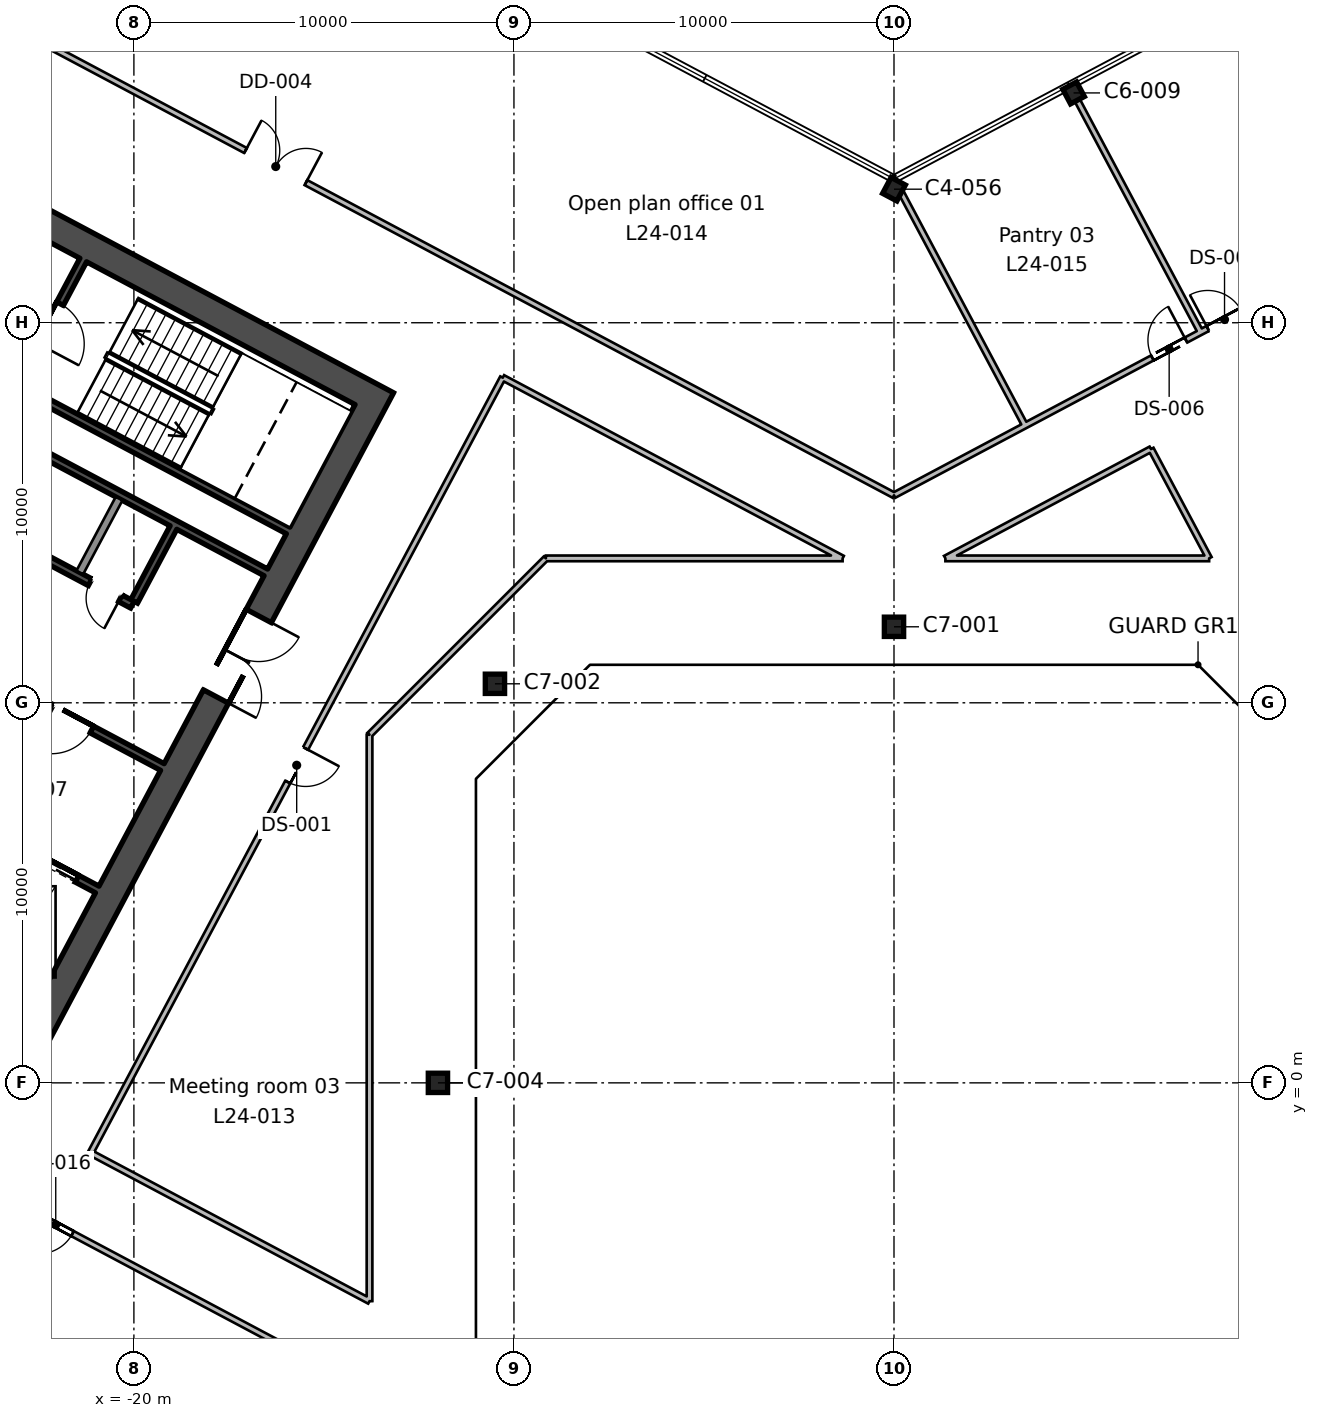
"""IFC4 building model, lengths in metres.
Left out: names, types, materials, properties, quantities, classifications, styles, units other than length and angle.
Written with IfcOpenShell. Run it as: python <this file> out.ifc"""

import sys

from ifc_helpers import new_model, si_unit, direction, frame, frame_2d, origin, origin_2d, place, context, subcontext, project, spatial, rectangle, hollow_rectangle, i_section, extrude, element, fill, save


model = new_model("IFC4")
c1 = context("Model", 3, precision=1e-05, world=origin(), true_north=direction((0.0, 1.0)))
c2 = subcontext(c1, "Body", "Model", "MODEL_VIEW")
j1 = project(units=[si_unit("LENGTHUNIT", "METRE"), si_unit("PLANEANGLEUNIT", "RADIAN")], contexts=[c1])
p1 = place(None, origin())
s1 = spatial("IfcSite", under=j1, at=p1, CompositionType="ELEMENT")
p2 = place(p1, origin())
s2 = spatial("IfcBuilding", under=s1, at=p2, CompositionType="ELEMENT")
p3 = place(p2, frame((0.0, 0.0, 122.2)))
s3 = spatial("IfcBuildingStorey", under=s2, at=p3, CompositionType="ELEMENT", Elevation=122.2)
for number, where, z_axis, x_axis in (
    (1, (-12.0, 0.0, 0.0), (0.0, 0.0, 1.0), (1.0, 0.0, 0.0)),
    (2, (-10.5, 10.5, 0.0), (0.0, 0.0, 1.0), (1.0, 0.0, 0.0)),
    (3, (0.0, 12.0, 0.0), (0.0, 0.0, 1.0), (1.0, 0.0, 0.0)),
):
    element("IfcColumn", number, at=place(p3, frame(where, z_axis=z_axis, x_axis=x_axis)), inside=s3, PredefinedType="COLUMN", context=c2, shape_type="SweptSolid", body=[
        extrude(hollow_rectangle(XDim=0.508, YDim=0.508, WallThickness=0.012, InnerFilletRadius=0.006, OuterFilletRadius=0.018, at=origin_2d()), origin(), (0.0, 0.0, 1.0), 4.0),
    ])
p4 = place(p3, frame((0.0, 23.514, 0.0), z_axis=(0.0, 0.0, 1.0), x_axis=(-0.882947592859, 0.469471562786, 0.0)))
e4 = element("IfcColumn", 4, at=p4, inside=s3, PredefinedType="COLUMN", context=c2, shape_type="SweptSolid", body=[
    extrude(i_section(OverallWidth=0.424, OverallDepth=0.475, WebThickness=0.048, FlangeThickness=0.077, FilletRadius=0.015, at=origin_2d()), origin(), (0.0, 0.0, 1.0), 4.0),
])
p5 = place(p3, frame((4.725, 26.047, 0.0), z_axis=(0.0, 0.0, 1.0), x_axis=(-0.882947592859, -0.469471562786, 0.0)))
e5 = element("IfcColumn", 5, at=p5, inside=s3, PredefinedType="COLUMN", context=c2, shape_type="SweptSolid", body=[
    extrude(i_section(OverallWidth=0.412, OverallDepth=0.434, WebThickness=0.036, FlangeThickness=0.057, FilletRadius=0.015, at=origin_2d()), origin(), (0.0, 0.0, 1.0), 4.0),
])
p6 = place(p3, frame((-13.498, 18.333, 0.0), z_axis=(0.0, 0.0, 1.0), x_axis=(-0.469469918705, -0.88294846703, 0.0)))
e6 = element("IfcWall", 6, at=p6, inside=s3, PredefinedType="SHEAR", context=c2, shape_type="SweptSolid", body=[
    extrude(rectangle(XDim=19.7, YDim=0.75, at=frame_2d((9.85, 0.0))), origin(), (0.0, 0.0, 1.0), 4.0),
])
p7 = place(p6, frame((6.85, 0.0, 0.0)))
e7 = element("IfcOpeningElement", 7, at=p7, cuts=e6, PredefinedType="OPENING", context=c2, shape_type="SweptSolid", body=[
    extrude(rectangle(XDim=2.4, YDim=2.4, at=frame_2d((1.2, 1.2))), frame((0.0, 0.385, 0.0), z_axis=(0.0, -1.0, 0.0), x_axis=(1.0, 0.0, 0.0)), (0.0, 0.0, 1.0), 0.77),
])
p8 = place(p3, frame((-14.005, 18.178, 0.0), z_axis=(0.0, 0.0, 1.0), x_axis=(-0.88295010195, 0.469466843842, 0.0)))
e8 = element("IfcWall", 8, at=p8, inside=s3, PredefinedType="SHEAR", context=c2, shape_type="SweptSolid", body=[
    extrude(rectangle(XDim=20.2, YDim=0.75, at=frame_2d((10.1, 0.0))), origin(), (0.0, 0.0, 1.0), 4.0),
])
p9 = place(p3, frame((-18.96, 14.611, 0.0), z_axis=(0.0, 0.0, 1.0), x_axis=(-0.4694473164, -0.882960484464, 0.0)))
e9 = element("IfcWall", 9, at=p9, inside=s3, PredefinedType="SHEAR", context=c2, shape_type="SweptSolid", body=[
    extrude(rectangle(XDim=2.2, YDim=0.2, at=frame_2d((1.1, 0.0))), origin(), (0.0, 0.0, 1.0), 4.0),
])
p10 = place(p3, frame((-20.39, 15.372, 0.0), z_axis=(0.0, 0.0, 1.0), x_axis=(-0.4694473164, -0.882960484464, 0.0)))
e10 = element("IfcWall", 10, at=p10, inside=s3, PredefinedType="SOLIDWALL", context=c2, shape_type="SweptSolid", body=[
    extrude(rectangle(XDim=2.2, YDim=0.2, at=frame_2d((1.1, 0.0))), origin(), (0.0, 0.0, 1.0), 4.0),
])
p11 = place(p3, frame((-21.333, 21.649, 0.0), z_axis=(0.0, 0.0, 1.0), x_axis=(-0.469494272526, -0.882935517501, 0.0)))
e11 = element("IfcWall", 11, at=p11, inside=s3, PredefinedType="SHEAR", context=c2, shape_type="SweptSolid", body=[
    extrude(rectangle(XDim=7.3, YDim=0.2, at=frame_2d((3.65, 0.0))), origin(), (0.0, 0.0, 1.0), 4.0),
])
p12 = place(p11, frame((1.3, 0.0, 0.0)))
e12 = element("IfcOpeningElement", 12, at=p12, cuts=e11, PredefinedType="OPENING", context=c2, shape_type="SweptSolid", body=[
    extrude(rectangle(XDim=1.2, YDim=2.1, at=frame_2d((0.6, 1.05))), frame((0.0, 0.11, 0.0), z_axis=(0.0, -1.0, 0.0), x_axis=(1.0, 0.0, 0.0)), (0.0, 0.0, 1.0), 0.22),
])
p13 = place(p3, frame((-15.942, 14.536, 0.0), z_axis=(0.0, 0.0, 1.0), x_axis=(-0.882946947542, 0.469472776449, 0.0)))
e13 = element("IfcWall", 13, at=p13, inside=s3, PredefinedType="SHEAR", context=c2, shape_type="SweptSolid", body=[
    extrude(rectangle(XDim=8.0, YDim=0.2, at=frame_2d((4.0, 0.0))), origin(), (0.0, 0.0, 1.0), 4.0),
])
p14 = place(p3, frame((-16.529, 13.432, 0.0), z_axis=(0.0, 0.0, 1.0), x_axis=(-0.88295287151, 0.469461634952, 0.0)))
e14 = element("IfcWall", 14, at=p14, inside=s3, PredefinedType="SHEAR", context=c2, shape_type="SweptSolid", body=[
    extrude(rectangle(XDim=8.0, YDim=0.2, at=frame_2d((4.0, 0.0))), origin(), (0.0, 0.0, 1.0), 4.0),
])
p15 = place(p3, frame((-20.04, 12.581, 0.0), z_axis=(0.0, 0.0, 1.0), x_axis=(-0.882942972946, 0.469480251476, 0.0)))
e15 = element("IfcWall", 15, at=p15, inside=s3, PredefinedType="SHEAR", context=c2, shape_type="SweptSolid", body=[
    extrude(rectangle(XDim=5.4, YDim=0.2, at=frame_2d((2.7, 0.0))), origin(), (0.0, 0.0, 1.0), 4.0),
])
p16 = place(p15, frame((0.36, 0.0, 0.0)))
e16 = element("IfcOpeningElement", 16, at=p16, cuts=e15, PredefinedType="OPENING", context=c2, shape_type="SweptSolid", body=[
    extrude(rectangle(XDim=0.9, YDim=2.1, at=frame_2d((0.45, 1.05))), frame((0.0, 0.11, 0.0), z_axis=(0.0, -1.0, 0.0), x_axis=(1.0, 0.0, 0.0)), (0.0, 0.0, 1.0), 0.22),
])
p17 = place(p15, frame((3.06, 0.0, 0.0)))
e17 = element("IfcOpeningElement", 17, at=p17, cuts=e15, PredefinedType="OPENING", context=c2, shape_type="SweptSolid", body=[
    extrude(rectangle(XDim=0.9, YDim=2.1, at=frame_2d((0.45, 1.05))), frame((0.0, 0.11, 0.0), z_axis=(0.0, -1.0, 0.0), x_axis=(1.0, 0.0, 0.0)), (0.0, 0.0, 1.0), 0.22),
])
p18 = place(p3, frame((-19.252, 8.311, 0.0), z_axis=(0.0, 0.0, 1.0), x_axis=(-0.882955722218, 0.469456273365, 0.0)))
e18 = element("IfcWall", 18, at=p18, inside=s3, PredefinedType="SHEAR", context=c2, shape_type="SweptSolid", body=[
    extrude(rectangle(XDim=10.0, YDim=0.2, at=frame_2d((5.0, 0.0))), origin(), (0.0, 0.0, 1.0), 4.0),
])
p19 = place(p18, frame((2.1, 0.0, 0.0)))
e19 = element("IfcOpeningElement", 19, at=p19, cuts=e18, PredefinedType="OPENING", context=c2, shape_type="SweptSolid", body=[
    extrude(rectangle(XDim=1.2, YDim=2.1, at=frame_2d((0.6, 1.05))), frame((0.0, 0.11, 0.0), z_axis=(0.0, -1.0, 0.0), x_axis=(1.0, 0.0, 0.0)), (0.0, 0.0, 1.0), 0.22),
])
p20 = place(p3, frame((-20.965, 5.088, 0.0), z_axis=(0.0, 0.0, 1.0), x_axis=(-0.882925986334, 0.469512196493, 0.0)))
e20 = element("IfcWall", 20, at=p20, inside=s3, PredefinedType="SHEAR", context=c2, shape_type="SweptSolid", body=[
    extrude(rectangle(XDim=4.5, YDim=0.2, at=frame_2d((2.25, 0.0))), origin(), (0.0, 0.0, 1.0), 4.0),
])
p21 = place(p20, frame((0.6, 0.0, 0.0)))
e21 = element("IfcOpeningElement", 21, at=p21, cuts=e20, PredefinedType="OPENING", context=c2, shape_type="SweptSolid", body=[
    extrude(rectangle(XDim=1.1, YDim=2.1, at=frame_2d((0.55, 1.05))), frame((0.0, 0.11, 0.0), z_axis=(0.0, -1.0, 0.0), x_axis=(1.0, 0.0, 0.0)), (0.0, 0.0, 1.0), 0.22),
])
p22 = place(p3, frame((-13.8, -8.122, 0.0), z_axis=(0.0, 0.0, 1.0), x_axis=(-0.882950271686, 0.469466524611, 0.0)))
e22 = element("IfcWall", 22, at=p22, inside=s3, PredefinedType="PARTITIONING", context=c2, shape_type="SweptSolid", body=[
    extrude(rectangle(XDim=34.727, YDim=0.15, at=frame_2d((17.363, 0.0))), origin(), (0.0, 0.0, 1.0), 3.64),
])
p23 = place(p22, frame((26.15, 0.0, 0.0)))
e23 = element("IfcOpeningElement", 23, at=p23, cuts=e22, PredefinedType="OPENING", context=c2, shape_type="SweptSolid", body=[
    extrude(rectangle(XDim=1.0, YDim=2.1, at=frame_2d((0.5, 1.05))), frame((0.0, 0.085, 0.0), z_axis=(0.0, -1.0, 0.0), x_axis=(1.0, 0.0, 0.0)), (0.0, 0.0, 1.0), 0.17),
])
p24 = place(p22, frame((16.85, 0.0, 0.0)))
e24 = element("IfcOpeningElement", 24, at=p24, cuts=e22, PredefinedType="OPENING", context=c2, shape_type="SweptSolid", body=[
    extrude(rectangle(XDim=1.0, YDim=2.1, at=frame_2d((0.5, 1.05))), frame((0.0, 0.085, 0.0), z_axis=(0.0, -1.0, 0.0), x_axis=(1.0, 0.0, 0.0)), (0.0, 0.0, 1.0), 0.17),
])
p25 = place(p22, frame((8.851, 0.0, 0.0)))
e25 = element("IfcOpeningElement", 25, at=p25, cuts=e22, PredefinedType="OPENING", context=c2, shape_type="SweptSolid", body=[
    extrude(rectangle(XDim=1.0, YDim=2.1, at=frame_2d((0.5, 1.05))), frame((0.0, 0.085, 0.0), z_axis=(0.0, -1.0, 0.0), x_axis=(1.0, 0.0, 0.0)), (0.0, 0.0, 1.0), 0.17),
])
p26 = place(p3, frame((-32.47, 32.724, 0.0), z_axis=(0.0, 0.0, 1.0), x_axis=(0.88295243426, -0.469462457321, 0.0)))
e26 = element("IfcWall", 26, at=p26, inside=s3, PredefinedType="PARTITIONING", context=c2, shape_type="SweptSolid", body=[
    extrude(rectangle(XDim=36.774, YDim=0.15, at=frame_2d((18.387, 0.0))), origin(), (0.0, 0.0, 1.0), 3.64),
])
p27 = place(p26, frame((17.45, 0.0, 0.0)))
e27 = element("IfcOpeningElement", 27, at=p27, cuts=e26, PredefinedType="OPENING", context=c2, shape_type="SweptSolid", body=[
    extrude(rectangle(XDim=1.8, YDim=2.1, at=frame_2d((0.9, 1.05))), frame((0.0, 0.085, 0.0), z_axis=(0.0, -1.0, 0.0), x_axis=(1.0, 0.0, 0.0)), (0.0, 0.0, 1.0), 0.17),
])
p28 = place(p26, frame((9.15, 0.0, 0.0)))
e28 = element("IfcOpeningElement", 28, at=p28, cuts=e26, PredefinedType="OPENING", context=c2, shape_type="SweptSolid", body=[
    extrude(rectangle(XDim=1.0, YDim=2.1, at=frame_2d((0.5, 1.05))), frame((0.0, 0.085, 0.0), z_axis=(0.0, -1.0, 0.0), x_axis=(1.0, 0.0, 0.0)), (0.0, 0.0, 1.0), 0.17),
])
p29 = place(p3, frame((0.0, 15.46, 0.0), z_axis=(0.0, 0.0, 1.0), x_axis=(0.882952116052, 0.469463055798, 0.0)))
e29 = element("IfcWall", 29, at=p29, inside=s3, PredefinedType="PARTITIONING", context=c2, shape_type="SweptSolid", body=[
    extrude(rectangle(XDim=18.96, YDim=0.15, at=frame_2d((9.48, 0.0))), origin(), (0.0, 0.0, 1.0), 3.64),
])
p30 = place(p29, frame((9.35, 0.0, 0.0)))
e30 = element("IfcOpeningElement", 30, at=p30, cuts=e29, PredefinedType="OPENING", context=c2, shape_type="SweptSolid", body=[
    extrude(rectangle(XDim=1.0, YDim=2.1, at=frame_2d((0.5, 1.05))), frame((0.0, 0.085, 0.0), z_axis=(0.0, -1.0, 0.0), x_axis=(1.0, 0.0, 0.0)), (0.0, 0.0, 1.0), 0.17),
])
p31 = place(p29, frame((7.7, 0.0, 0.0)))
e31 = element("IfcOpeningElement", 31, at=p31, cuts=e29, PredefinedType="OPENING", context=c2, shape_type="SweptSolid", body=[
    extrude(rectangle(XDim=1.0, YDim=2.1, at=frame_2d((0.5, 1.05))), frame((0.0, 0.085, 0.0), z_axis=(0.0, -1.0, 0.0), x_axis=(1.0, 0.0, 0.0)), (0.0, 0.0, 1.0), 0.17),
])
p32 = place(p3, frame((0.191, 23.422, 0.0), z_axis=(0.0, 0.0, 1.0), x_axis=(0.46954180368, -0.882910241529, 0.0)))
e32 = element("IfcWall", 32, at=p32, inside=s3, PredefinedType="PARTITIONING", context=c2, shape_type="SweptSolid", body=[
    extrude(rectangle(XDim=6.941, YDim=0.15, at=frame_2d((3.47, 0.0))), origin(), (0.0, 0.0, 1.0), 3.64),
])
p33 = place(p3, frame((4.822, 25.853, 0.0), z_axis=(0.0, 0.0, 1.0), x_axis=(0.46953215053, -0.882915375117, 0.0)))
e33 = element("IfcWall", 33, at=p33, inside=s3, PredefinedType="PARTITIONING", context=c2, shape_type="SweptSolid", body=[
    extrude(rectangle(XDim=6.914, YDim=0.15, at=frame_2d((3.457, 0.0))), origin(), (0.0, 0.0, 1.0), 3.64),
])
p34 = place(p3, frame((-21.139, -1.841, 0.0), z_axis=(0.0, 0.0, 1.0), x_axis=(0.46947923089, 0.882943515613, 0.0)))
e34 = element("IfcWall", 34, at=p34, inside=s3, PredefinedType="PARTITIONING", context=c2, shape_type="SweptSolid", body=[
    extrude(rectangle(XDim=23.1, YDim=0.15, at=frame_2d((11.55, 0.0))), origin(), (0.0, 0.0, 1.0), 3.64),
])
p35 = place(p34, frame((11.05, 0.0, 0.0)))
e35 = element("IfcOpeningElement", 35, at=p35, cuts=e34, PredefinedType="OPENING", context=c2, shape_type="SweptSolid", body=[
    extrude(rectangle(XDim=1.0, YDim=2.1, at=frame_2d((0.5, 1.05))), frame((0.0, 0.085, 0.0), z_axis=(0.0, -1.0, 0.0), x_axis=(1.0, 0.0, 0.0)), (0.0, 0.0, 1.0), 0.17),
])
p36 = place(p3, frame((-10.294, 18.555, 0.0), z_axis=(0.0, 0.0, 1.0), x_axis=(0.882931500577, -0.469501826714, 0.0)))
e36 = element("IfcWall", 36, at=p36, inside=s3, PredefinedType="PARTITIONING", context=c2, shape_type="SweptSolid", body=[
    extrude(rectangle(XDim=10.127, YDim=0.15, at=frame_2d((5.064, 0.0))), origin(), (0.0, 0.0, 1.0), 3.64),
])
p37 = place(p3, frame((-1.352, 13.8, 0.0), z_axis=(0.0, 0.0, 1.0), x_axis=(-1.0, 0.0, 0.0)))
e37 = element("IfcWall", 37, at=p37, inside=s3, PredefinedType="PARTITIONING", context=c2, shape_type="SweptSolid", body=[
    extrude(rectangle(XDim=7.808, YDim=0.15, at=frame_2d((3.904, 0.0))), origin(), (0.0, 0.0, 1.0), 3.64),
])
p38 = place(p3, frame((-9.16, 13.8, 0.0), z_axis=(0.0, 0.0, 1.0), x_axis=(-0.707106781187, -0.707106781187, 0.0)))
e38 = element("IfcWall", 38, at=p38, inside=s3, PredefinedType="PARTITIONING", context=c2, shape_type="SweptSolid", body=[
    extrude(rectangle(XDim=6.562, YDim=0.15, at=frame_2d((3.281, 0.0))), origin(), (0.0, 0.0, 1.0), 3.64),
])
p39 = place(p3, frame((-13.8, 9.16, 0.0), z_axis=(0.0, 0.0, 1.0), x_axis=(0.0, -1.0, 0.0)))
e39 = element("IfcWall", 39, at=p39, inside=s3, PredefinedType="PARTITIONING", context=c2, shape_type="SweptSolid", body=[
    extrude(rectangle(XDim=14.904, YDim=0.15, at=frame_2d((7.452, 0.0))), origin(), (0.0, 0.0, 1.0), 3.64),
])
p40 = place(p3, frame((-13.8, -5.744, 0.0), z_axis=(0.0, 0.0, 1.0), x_axis=(-0.882913323819, 0.469536007803, 0.0)))
e40 = element("IfcWall", 40, at=p40, inside=s3, PredefinedType="PARTITIONING", context=c2, shape_type="SweptSolid", body=[
    extrude(rectangle(XDim=8.312, YDim=0.15, at=frame_2d((4.156, 0.0))), origin(), (0.0, 0.0, 1.0), 3.64),
])
p41 = place(p3, frame((1.352, 13.8, 0.0), z_axis=(0.0, 0.0, 1.0), x_axis=(1.0, 0.0, 0.0)))
e41 = element("IfcWall", 41, at=p41, inside=s3, PredefinedType="PARTITIONING", context=c2, shape_type="SweptSolid", body=[
    extrude(rectangle(XDim=6.94, YDim=0.15, at=frame_2d((3.47, 0.0))), origin(), (0.0, 0.0, 1.0), 3.64),
])
p42 = place(p3, frame((8.292, 13.8, 0.0), z_axis=(0.0, 0.0, 1.0), x_axis=(-0.469549600855, 0.882906094858, 0.0)))
e42 = element("IfcWall", 42, at=p42, inside=s3, PredefinedType="PARTITIONING", context=c2, shape_type="SweptSolid", body=[
    extrude(rectangle(XDim=3.259, YDim=0.15, at=frame_2d((1.629, 0.0))), origin(), (0.0, 0.0, 1.0), 3.64),
])
p43 = place(p3, frame((6.762, 16.677, 0.0), z_axis=(0.0, 0.0, 1.0), x_axis=(-0.882917024124, -0.469529049699, 0.0)))
e43 = element("IfcWall", 43, at=p43, inside=s3, PredefinedType="PARTITIONING", context=c2, shape_type="SweptSolid", body=[
    extrude(rectangle(XDim=6.127, YDim=0.15, at=frame_2d((3.063, 0.0))), origin(), (0.0, 0.0, 1.0), 3.64),
])
p44 = place(p7, origin())
e44 = element("IfcDoor", 44, at=p44, inside=s3, OperationType="DOUBLE_DOOR_SINGLE_SWING", PredefinedType="DOOR", context=c2, shape_type="SweptSolid", body=[
    extrude(rectangle(XDim=2.4, YDim=2.4, at=frame_2d((1.2, 1.2))), frame((0.0, 0.025, 0.0), z_axis=(0.0, -1.0, 0.0), x_axis=(1.0, 0.0, 0.0)), (0.0, 0.0, 1.0), 0.05),
])
fill(e7, e44)
p45 = place(p19, origin())
e45 = element("IfcDoor", 45, at=p45, inside=s3, OperationType="SINGLE_SWING_RIGHT", PredefinedType="DOOR", context=c2, shape_type="SweptSolid", body=[
    extrude(rectangle(XDim=1.2, YDim=2.1, at=frame_2d((0.6, 1.05))), frame((0.0, 0.025, 0.0), z_axis=(0.0, -1.0, 0.0), x_axis=(1.0, 0.0, 0.0)), (0.0, 0.0, 1.0), 0.05),
])
fill(e19, e45)
p46 = place(p12, origin())
e46 = element("IfcDoor", 46, at=p46, inside=s3, OperationType="SINGLE_SWING_RIGHT", PredefinedType="DOOR", context=c2, shape_type="SweptSolid", body=[
    extrude(rectangle(XDim=1.2, YDim=2.1, at=frame_2d((0.6, 1.05))), frame((0.0, 0.025, 0.0), z_axis=(0.0, -1.0, 0.0), x_axis=(1.0, 0.0, 0.0)), (0.0, 0.0, 1.0), 0.05),
])
fill(e12, e46)
p47 = place(p16, origin())
e47 = element("IfcDoor", 47, at=p47, inside=s3, OperationType="SINGLE_SWING_LEFT", PredefinedType="DOOR", context=c2, shape_type="SweptSolid", body=[
    extrude(rectangle(XDim=0.9, YDim=2.1, at=frame_2d((0.45, 1.05))), frame((0.0, 0.025, 0.0), z_axis=(0.0, -1.0, 0.0), x_axis=(1.0, 0.0, 0.0)), (0.0, 0.0, 1.0), 0.05),
])
fill(e16, e47)
p48 = place(p21, origin())
e48 = element("IfcDoor", 48, at=p48, inside=s3, OperationType="DOUBLE_DOOR_SLIDING", PredefinedType="DOOR", context=c2, shape_type="SweptSolid", body=[
    extrude(rectangle(XDim=1.1, YDim=2.1, at=frame_2d((0.55, 1.05))), frame((0.0, 0.025, 0.0), z_axis=(0.0, -1.0, 0.0), x_axis=(1.0, 0.0, 0.0)), (0.0, 0.0, 1.0), 0.05),
])
fill(e21, e48)
p49 = place(p35, frame((1.0, 0.0, 0.0), z_axis=(0.0, 0.0, 1.0), x_axis=(-1.0, 0.0, 0.0)))
e49 = element("IfcDoor", 49, at=p49, inside=s3, OperationType="SINGLE_SWING_LEFT", PredefinedType="DOOR", context=c2, shape_type="SweptSolid", body=[
    extrude(rectangle(XDim=1.0, YDim=2.1, at=frame_2d((0.5, 1.05))), frame((0.0, 0.025, 0.0), z_axis=(0.0, -1.0, 0.0), x_axis=(1.0, 0.0, 0.0)), (0.0, 0.0, 1.0), 0.05),
])
fill(e35, e49)
p50 = place(p30, origin())
e50 = element("IfcDoor", 50, at=p50, inside=s3, OperationType="SINGLE_SWING_LEFT", PredefinedType="DOOR", context=c2, shape_type="SweptSolid", body=[
    extrude(rectangle(XDim=1.0, YDim=2.1, at=frame_2d((0.5, 1.05))), frame((0.0, 0.025, 0.0), z_axis=(0.0, -1.0, 0.0), x_axis=(1.0, 0.0, 0.0)), (0.0, 0.0, 1.0), 0.05),
])
fill(e30, e50)
p51 = place(p31, origin())
e51 = element("IfcDoor", 51, at=p51, inside=s3, OperationType="SINGLE_SWING_RIGHT", PredefinedType="DOOR", context=c2, shape_type="SweptSolid", body=[
    extrude(rectangle(XDim=1.0, YDim=2.1, at=frame_2d((0.5, 1.05))), frame((0.0, 0.025, 0.0), z_axis=(0.0, -1.0, 0.0), x_axis=(1.0, 0.0, 0.0)), (0.0, 0.0, 1.0), 0.05),
])
fill(e31, e51)
p52 = place(p27, origin())
e52 = element("IfcDoor", 52, at=p52, inside=s3, OperationType="DOUBLE_DOOR_SINGLE_SWING", PredefinedType="DOOR", context=c2, shape_type="SweptSolid", body=[
    extrude(rectangle(XDim=1.8, YDim=2.1, at=frame_2d((0.9, 1.05))), frame((0.0, 0.025, 0.0), z_axis=(0.0, -1.0, 0.0), x_axis=(1.0, 0.0, 0.0)), (0.0, 0.0, 1.0), 0.05),
])
fill(e27, e52)
p53 = place(p25, origin())
e53 = element("IfcDoor", 53, at=p53, inside=s3, OperationType="SINGLE_SWING_RIGHT", PredefinedType="DOOR", context=c2, shape_type="SweptSolid", body=[
    extrude(rectangle(XDim=1.0, YDim=2.1, at=frame_2d((0.5, 1.05))), frame((0.0, 0.025, 0.0), z_axis=(0.0, -1.0, 0.0), x_axis=(1.0, 0.0, 0.0)), (0.0, 0.0, 1.0), 0.05),
])
fill(e25, e53)
save(model, sys.argv[1])
